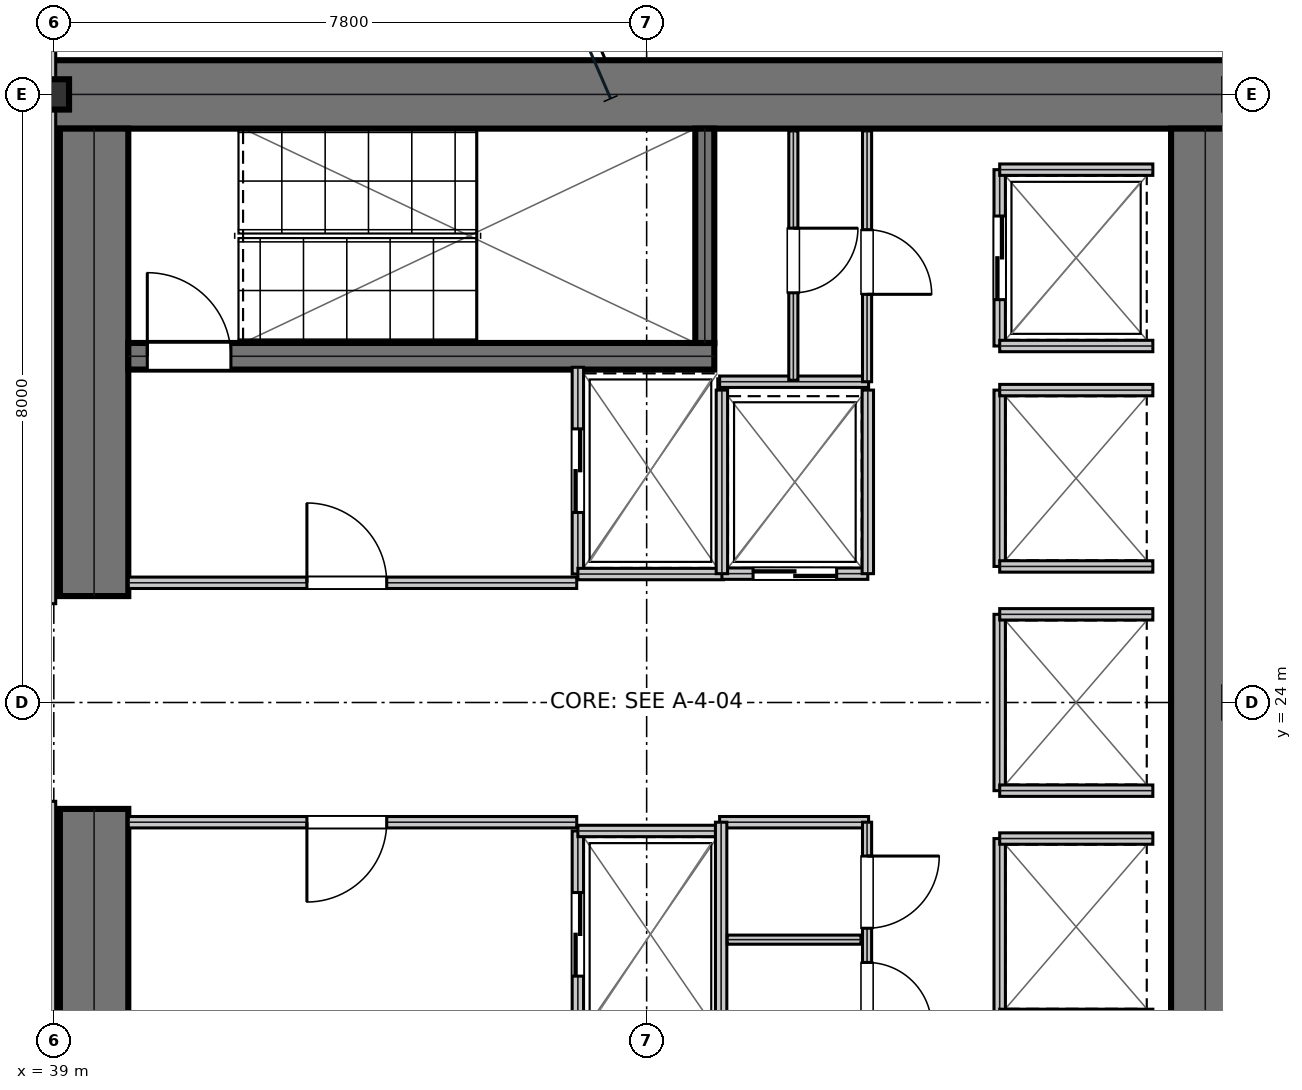
"""IFC4 building model, lengths in metres.
Left out: names, types, materials, properties, quantities, classifications, styles, units other than length and angle.
Written with IfcOpenShell. Run it as: python <this file> out.ifc"""

import sys

from ifc_helpers import new_model, si_unit, direction, frame, frame_2d, origin, origin_2d, place, context, subcontext, project, spatial, rectangle, i_section, extrude, element, fill, save


model = new_model("IFC4")
c1 = context("Model", 3, precision=1e-05, world=origin(), true_north=direction((0.0, 1.0)))
c2 = subcontext(c1, "Body", "Model", "MODEL_VIEW")
j1 = project(units=[si_unit("LENGTHUNIT", "METRE"), si_unit("PLANEANGLEUNIT", "RADIAN")], contexts=[c1])
p1 = place(None, origin())
s1 = spatial("IfcSite", under=j1, at=p1, CompositionType="ELEMENT")
p2 = place(p1, origin())
s2 = spatial("IfcBuilding", under=s1, at=p2, CompositionType="ELEMENT")
p3 = place(p2, frame((0.0, 0.0, 90.45)))
s3 = spatial("IfcBuildingStorey", under=s2, at=p3, CompositionType="ELEMENT", Elevation=90.45)
p4 = place(p3, frame((38.8, 32.0, 0.0), z_axis=(0.0, 0.0, 1.0), x_axis=(1.0, 0.0, 0.0)))
e1 = element("IfcWall", 1, at=p4, inside=s3, PredefinedType="SHEAR", context=c2, shape_type="SweptSolid", body=[
    extrude(rectangle(XDim=16.0, YDim=0.9, at=frame_2d((8.0, 0.0))), origin(), (0.0, 0.0, 1.0), 3.81),
])
for number, where, z_axis, x_axis in (
    (2, (39.53, 16.45, 0.0), (0.0, 0.0, 1.0), (0.0, 1.0, 0.0)),
    (3, (39.53, 25.4, 0.0), (0.0, 0.0, 1.0), (0.0, 1.0, 0.0)),
):
    element("IfcWall", number, at=place(p3, frame(where, z_axis=z_axis, x_axis=x_axis)), inside=s3, PredefinedType="SHEAR", context=c2, shape_type="SweptSolid", body=[
        extrude(rectangle(XDim=6.15, YDim=0.9, at=frame_2d((3.075, 0.0))), origin(), (0.0, 0.0, 1.0), 3.81),
    ])
p5 = place(p3, frame((54.15, 16.45, 0.0), z_axis=(0.0, 0.0, 1.0), x_axis=(0.0, 1.0, 0.0)))
e4 = element("IfcWall", 4, at=p5, inside=s3, PredefinedType="SHEAR", context=c2, shape_type="SweptSolid", body=[
    extrude(rectangle(XDim=15.1, YDim=0.9, at=frame_2d((7.55, 0.0))), origin(), (0.0, 0.0, 1.0), 3.81),
])
p6 = place(p3, frame((39.98, 28.555, 0.0), z_axis=(0.0, 0.0, 1.0), x_axis=(1.0, 0.0, 0.0)))
e5 = element("IfcWall", 5, at=p6, inside=s3, PredefinedType="SHEAR", context=c2, shape_type="SweptSolid", body=[
    extrude(rectangle(XDim=7.71, YDim=0.35, at=frame_2d((3.855, 0.0))), origin(), (0.0, 0.0, 1.0), 3.81),
])
p7 = place(p6, frame((0.25, 0.0, 0.0)))
e6 = element("IfcOpeningElement", 6, at=p7, cuts=e5, PredefinedType="OPENING", context=c2, shape_type="SweptSolid", body=[
    extrude(rectangle(XDim=1.1, YDim=2.15, at=frame_2d((0.55, 1.075))), frame((0.0, 0.185, 0.0), z_axis=(0.0, -1.0, 0.0), x_axis=(1.0, 0.0, 0.0)), (0.0, 0.0, 1.0), 0.37),
])
p8 = place(p3, frame((47.565, 28.73, 0.0), z_axis=(0.0, 0.0, 1.0), x_axis=(0.0, 1.0, 0.0)))
e7 = element("IfcWall", 7, at=p8, inside=s3, PredefinedType="SHEAR", context=c2, shape_type="SweptSolid", body=[
    extrude(rectangle(XDim=2.82, YDim=0.25, at=frame_2d((1.41, 0.0))), origin(), (0.0, 0.0, 1.0), 3.81),
])
p9 = place(p3, frame((39.0, 32.0, 0.0), z_axis=(0.0, 0.0, 1.0), x_axis=(1.0, 0.0, 0.0)))
e8 = element("IfcColumn", 8, at=p9, inside=s3, PredefinedType="COLUMN", context=c2, shape_type="SweptSolid", body=[
    extrude(i_section(OverallWidth=0.401, OverallDepth=0.399, WebThickness=0.025, FlangeThickness=0.04, at=origin_2d()), origin(), (0.0, 0.0, 1.0), 4.044),
])
p10 = place(p3, frame((39.98, 25.575, 0.0), z_axis=(0.0, 0.0, 1.0), x_axis=(1.0, 0.0, 0.0)))
e9 = element("IfcWall", 9, at=p10, inside=s3, PredefinedType="PARTITIONING", context=c2, shape_type="SweptSolid", body=[
    extrude(rectangle(XDim=5.9, YDim=0.15, at=frame_2d((2.95, 0.0))), origin(), (0.0, 0.0, 1.0), 3.81),
])
p11 = place(p10, frame((2.35, 0.0, 0.0)))
e10 = element("IfcOpeningElement", 10, at=p11, cuts=e9, PredefinedType="OPENING", context=c2, shape_type="SweptSolid", body=[
    extrude(rectangle(XDim=1.05, YDim=2.15, at=frame_2d((0.525, 1.075))), frame((0.0, 0.085, 0.0), z_axis=(0.0, -1.0, 0.0), x_axis=(1.0, 0.0, 0.0)), (0.0, 0.0, 1.0), 0.17),
])
p12 = place(p3, frame((39.98, 22.425, 0.0), z_axis=(0.0, 0.0, 1.0), x_axis=(1.0, 0.0, 0.0)))
e11 = element("IfcWall", 11, at=p12, inside=s3, PredefinedType="PARTITIONING", context=c2, shape_type="SweptSolid", body=[
    extrude(rectangle(XDim=5.9, YDim=0.15, at=frame_2d((2.95, 0.0))), origin(), (0.0, 0.0, 1.0), 3.81),
])
p13 = place(p12, frame((2.35, 0.0, 0.0)))
e12 = element("IfcOpeningElement", 12, at=p13, cuts=e11, PredefinedType="OPENING", context=c2, shape_type="SweptSolid", body=[
    extrude(rectangle(XDim=1.05, YDim=2.15, at=frame_2d((0.525, 1.075))), frame((0.0, 0.085, 0.0), z_axis=(0.0, -1.0, 0.0), x_axis=(1.0, 0.0, 0.0)), (0.0, 0.0, 1.0), 0.17),
])
p14 = place(p3, frame((45.895, 25.69, 0.0), z_axis=(0.0, 0.0, 1.0), x_axis=(0.0, 1.0, 0.0)))
e13 = element("IfcWall", 13, at=p14, inside=s3, PredefinedType="PARTITIONING", context=c2, shape_type="SweptSolid", body=[
    extrude(rectangle(XDim=2.72, YDim=0.15, at=frame_2d((1.36, 0.0))), origin(), (0.0, 0.0, 1.0), 3.81),
])
p15 = place(p14, frame((0.81, 0.0, 0.0)))
e14 = element("IfcOpeningElement", 14, at=p15, cuts=e13, PredefinedType="OPENING", context=c2, shape_type="SweptSolid", body=[
    extrude(rectangle(XDim=1.1, YDim=2.15, at=frame_2d((0.55, 1.075))), frame((0.0, 0.085, 0.0), z_axis=(0.0, -1.0, 0.0), x_axis=(1.0, 0.0, 0.0)), (0.0, 0.0, 1.0), 0.17),
])
p16 = place(p3, frame((45.895, 25.69, 0.0), z_axis=(0.0, 0.0, 1.0), x_axis=(1.0, 0.0, 0.0)))
e15 = element("IfcWall", 15, at=p16, inside=s3, PredefinedType="PARTITIONING", context=c2, shape_type="SweptSolid", body=[
    extrude(rectangle(XDim=1.915, YDim=0.15, at=frame_2d((0.958, 0.0))), origin(), (0.0, 0.0, 1.0), 3.81),
])
p17 = place(p3, frame((45.895, 19.59, 0.0), z_axis=(0.0, 0.0, 1.0), x_axis=(0.0, 1.0, 0.0)))
e16 = element("IfcWall", 16, at=p17, inside=s3, PredefinedType="PARTITIONING", context=c2, shape_type="SweptSolid", body=[
    extrude(rectangle(XDim=2.72, YDim=0.15, at=frame_2d((1.36, 0.0))), origin(), (0.0, 0.0, 1.0), 3.81),
])
p18 = place(p17, frame((0.81, 0.0, 0.0)))
e17 = element("IfcOpeningElement", 17, at=p18, cuts=e16, PredefinedType="OPENING", context=c2, shape_type="SweptSolid", body=[
    extrude(rectangle(XDim=1.1, YDim=2.15, at=frame_2d((0.55, 1.075))), frame((0.0, 0.085, 0.0), z_axis=(0.0, -1.0, 0.0), x_axis=(1.0, 0.0, 0.0)), (0.0, 0.0, 1.0), 0.17),
])
p19 = place(p3, frame((45.895, 22.31, 0.0), z_axis=(0.0, 0.0, 1.0), x_axis=(1.0, 0.0, 0.0)))
e18 = element("IfcWall", 18, at=p19, inside=s3, PredefinedType="PARTITIONING", context=c2, shape_type="SweptSolid", body=[
    extrude(rectangle(XDim=1.915, YDim=0.15, at=frame_2d((0.958, 0.0))), origin(), (0.0, 0.0, 1.0), 3.81),
])
p20 = place(p3, frame((47.79, 25.695, 0.0), z_axis=(0.0, 0.0, 1.0), x_axis=(1.0, 0.0, 0.0)))
e19 = element("IfcWall", 19, at=p20, inside=s3, PredefinedType="PARTITIONING", context=c2, shape_type="SweptSolid", body=[
    extrude(rectangle(XDim=1.92, YDim=0.15, at=frame_2d((0.96, 0.0))), origin(), (0.0, 0.0, 1.0), 3.81),
])
p21 = place(p20, frame((0.41, 0.0, 0.0)))
e20 = element("IfcOpeningElement", 20, at=p21, cuts=e19, PredefinedType="OPENING", context=c2, shape_type="SweptSolid", body=[
    extrude(rectangle(XDim=1.1, YDim=2.15, at=frame_2d((0.55, 1.075))), frame((0.0, 0.085, 0.0), z_axis=(0.0, -1.0, 0.0), x_axis=(1.0, 0.0, 0.0)), (0.0, 0.0, 1.0), 0.17),
])
for number, where, z_axis, x_axis in (
    (21, (47.79, 25.695, 0.0), (0.0, 0.0, 1.0), (0.0, 1.0, 0.0)),
    (22, (49.71, 25.695, 0.0), (0.0, 0.0, 1.0), (0.0, 1.0, 0.0)),
):
    element("IfcWall", number, at=place(p3, frame(where, z_axis=z_axis, x_axis=x_axis)), inside=s3, PredefinedType="PARTITIONING", context=c2, shape_type="SweptSolid", body=[
        extrude(rectangle(XDim=2.415, YDim=0.15, at=frame_2d((1.208, 0.0))), origin(), (0.0, 0.0, 1.0), 3.81),
    ])
p22 = place(p3, frame((51.445, 28.69, 0.0), z_axis=(0.0, 0.0, 1.0), x_axis=(0.0, 1.0, 0.0)))
e23 = element("IfcWall", 23, at=p22, inside=s3, PredefinedType="PARTITIONING", context=c2, shape_type="SweptSolid", body=[
    extrude(rectangle(XDim=2.32, YDim=0.15, at=frame_2d((1.16, 0.0))), origin(), (0.0, 0.0, 1.0), 3.81),
])
p23 = place(p22, frame((0.61, 0.0, 0.0)))
e24 = element("IfcOpeningElement", 24, at=p23, cuts=e23, PredefinedType="OPENING", context=c2, shape_type="SweptSolid", body=[
    extrude(rectangle(XDim=1.1, YDim=2.15, at=frame_2d((0.55, 1.075))), frame((0.0, 0.085, 0.0), z_axis=(0.0, -1.0, 0.0), x_axis=(1.0, 0.0, 0.0)), (0.0, 0.0, 1.0), 0.17),
])
for number, where, z_axis, x_axis in (
    (25, (51.445, 28.69, 0.0), (0.0, 0.0, 1.0), (1.0, 0.0, 0.0)),
    (26, (51.445, 31.01, 0.0), (0.0, 0.0, 1.0), (1.0, 0.0, 0.0)),
):
    element("IfcWall", number, at=place(p3, frame(where, z_axis=z_axis, x_axis=x_axis)), inside=s3, PredefinedType="PARTITIONING", context=c2, shape_type="SweptSolid", body=[
        extrude(rectangle(XDim=2.015, YDim=0.15, at=frame_2d((1.007, 0.0))), origin(), (0.0, 0.0, 1.0), 3.81),
    ])
p24 = place(p3, frame((51.445, 25.79, 0.0), z_axis=(0.0, 0.0, 1.0), x_axis=(0.0, 1.0, 0.0)))
e27 = element("IfcWall", 27, at=p24, inside=s3, PredefinedType="PARTITIONING", context=c2, shape_type="SweptSolid", body=[
    extrude(rectangle(XDim=2.32, YDim=0.15, at=frame_2d((1.16, 0.0))), origin(), (0.0, 0.0, 1.0), 3.81),
])
for number, where, z_axis, x_axis in (
    (28, (51.445, 25.79, 0.0), (0.0, 0.0, 1.0), (1.0, 0.0, 0.0)),
    (29, (51.445, 28.11, 0.0), (0.0, 0.0, 1.0), (1.0, 0.0, 0.0)),
):
    element("IfcWall", number, at=place(p3, frame(where, z_axis=z_axis, x_axis=x_axis)), inside=s3, PredefinedType="PARTITIONING", context=c2, shape_type="SweptSolid", body=[
        extrude(rectangle(XDim=2.015, YDim=0.15, at=frame_2d((1.007, 0.0))), origin(), (0.0, 0.0, 1.0), 3.81),
    ])
p25 = place(p3, frame((51.445, 19.89, 0.0), z_axis=(0.0, 0.0, 1.0), x_axis=(0.0, 1.0, 0.0)))
e30 = element("IfcWall", 30, at=p25, inside=s3, PredefinedType="PARTITIONING", context=c2, shape_type="SweptSolid", body=[
    extrude(rectangle(XDim=2.32, YDim=0.15, at=frame_2d((1.16, 0.0))), origin(), (0.0, 0.0, 1.0), 3.81),
])
for number, where, z_axis, x_axis in (
    (31, (51.445, 19.89, 0.0), (0.0, 0.0, 1.0), (1.0, 0.0, 0.0)),
    (32, (51.445, 22.21, 0.0), (0.0, 0.0, 1.0), (1.0, 0.0, 0.0)),
):
    element("IfcWall", number, at=place(p3, frame(where, z_axis=z_axis, x_axis=x_axis)), inside=s3, PredefinedType="PARTITIONING", context=c2, shape_type="SweptSolid", body=[
        extrude(rectangle(XDim=2.015, YDim=0.15, at=frame_2d((1.007, 0.0))), origin(), (0.0, 0.0, 1.0), 3.81),
    ])
p26 = place(p3, frame((51.445, 22.84, 0.0), z_axis=(0.0, 0.0, 1.0), x_axis=(0.0, 1.0, 0.0)))
e33 = element("IfcWall", 33, at=p26, inside=s3, PredefinedType="PARTITIONING", context=c2, shape_type="SweptSolid", body=[
    extrude(rectangle(XDim=2.32, YDim=0.15, at=frame_2d((1.16, 0.0))), origin(), (0.0, 0.0, 1.0), 3.81),
])
for number, where, z_axis, x_axis in (
    (34, (51.445, 22.84, 0.0), (0.0, 0.0, 1.0), (1.0, 0.0, 0.0)),
    (35, (51.445, 25.16, 0.0), (0.0, 0.0, 1.0), (1.0, 0.0, 0.0)),
):
    element("IfcWall", number, at=place(p3, frame(where, z_axis=z_axis, x_axis=x_axis)), inside=s3, PredefinedType="PARTITIONING", context=c2, shape_type="SweptSolid", body=[
        extrude(rectangle(XDim=2.015, YDim=0.15, at=frame_2d((1.007, 0.0))), origin(), (0.0, 0.0, 1.0), 3.81),
    ])
p27 = place(p3, frame((47.76, 22.425, 0.0), z_axis=(0.0, 0.0, 1.0), x_axis=(1.0, 0.0, 0.0)))
e36 = element("IfcWall", 36, at=p27, inside=s3, PredefinedType="PARTITIONING", context=c2, shape_type="SweptSolid", body=[
    extrude(rectangle(XDim=1.96, YDim=0.15, at=frame_2d((0.98, 0.0))), origin(), (0.0, 0.0, 1.0), 3.81),
])
p28 = place(p3, frame((47.78, 16.45, 0.0), z_axis=(0.0, 0.0, 1.0), x_axis=(0.0, 1.0, 0.0)))
e37 = element("IfcWall", 37, at=p28, inside=s3, PredefinedType="PARTITIONING", context=c2, shape_type="SweptSolid", body=[
    extrude(rectangle(XDim=5.975, YDim=0.15, at=frame_2d((2.988, 0.0))), origin(), (0.0, 0.0, 1.0), 3.81),
])
p29 = place(p3, frame((47.86, 20.88, 0.0), z_axis=(0.0, 0.0, 1.0), x_axis=(1.0, 0.0, 0.0)))
e38 = element("IfcWall", 38, at=p29, inside=s3, PredefinedType="PARTITIONING", context=c2, shape_type="SweptSolid", body=[
    extrude(rectangle(XDim=1.76, YDim=0.12, at=frame_2d((0.88, 0.0))), origin(), (0.0, 0.0, 1.0), 3.81),
])
p30 = place(p3, frame((49.7, 16.48, 0.0), z_axis=(0.0, 0.0, 1.0), x_axis=(0.0, 1.0, 0.0)))
e39 = element("IfcWall", 39, at=p30, inside=s3, PredefinedType="PARTITIONING", context=c2, shape_type="SweptSolid", body=[
    extrude(rectangle(XDim=5.945, YDim=0.12, at=frame_2d((2.973, 0.0))), origin(), (0.0, 0.0, 1.0), 3.81),
])
p31 = place(p30, frame((1.6, 0.0, 0.0)))
e40 = element("IfcOpeningElement", 40, at=p31, cuts=e39, PredefinedType="OPENING", context=c2, shape_type="SweptSolid", body=[
    extrude(rectangle(XDim=0.85, YDim=2.15, at=frame_2d((0.425, 1.075))), frame((0.0, 0.07, 0.0), z_axis=(0.0, -1.0, 0.0), x_axis=(1.0, 0.0, 0.0)), (0.0, 0.0, 1.0), 0.14),
])
p32 = place(p30, frame((3.25, 0.0, 0.0)))
e41 = element("IfcOpeningElement", 41, at=p32, cuts=e39, PredefinedType="OPENING", context=c2, shape_type="SweptSolid", body=[
    extrude(rectangle(XDim=0.85, YDim=2.15, at=frame_2d((0.425, 1.075))), frame((0.0, 0.07, 0.0), z_axis=(0.0, -1.0, 0.0), x_axis=(1.0, 0.0, 0.0)), (0.0, 0.0, 1.0), 0.14),
])
p33 = place(p30, frame((4.55, 0.0, 0.0)))
e42 = element("IfcOpeningElement", 42, at=p33, cuts=e39, PredefinedType="OPENING", context=c2, shape_type="SweptSolid", body=[
    extrude(rectangle(XDim=0.95, YDim=2.15, at=frame_2d((0.475, 1.075))), frame((0.0, 0.07, 0.0), z_axis=(0.0, -1.0, 0.0), x_axis=(1.0, 0.0, 0.0)), (0.0, 0.0, 1.0), 0.14),
])
p34 = place(p3, frame((47.76, 28.22, 0.0), z_axis=(0.0, 0.0, 1.0), x_axis=(1.0, 0.0, 0.0)))
e43 = element("IfcWall", 43, at=p34, inside=s3, PredefinedType="PARTITIONING", context=c2, shape_type="SweptSolid", body=[
    extrude(rectangle(XDim=1.96, YDim=0.15, at=frame_2d((0.98, 0.0))), origin(), (0.0, 0.0, 1.0), 3.81),
])
p35 = place(p3, frame((48.73, 28.24, 0.0), z_axis=(0.0, 0.0, 1.0), x_axis=(0.0, 1.0, 0.0)))
e44 = element("IfcWall", 44, at=p35, inside=s3, PredefinedType="PARTITIONING", context=c2, shape_type="SweptSolid", body=[
    extrude(rectangle(XDim=3.28, YDim=0.12, at=frame_2d((1.64, 0.0))), origin(), (0.0, 0.0, 1.0), 3.81),
])
p36 = place(p35, frame((1.15, 0.0, 0.0)))
e45 = element("IfcOpeningElement", 45, at=p36, cuts=e44, PredefinedType="OPENING", context=c2, shape_type="SweptSolid", body=[
    extrude(rectangle(XDim=0.85, YDim=2.15, at=frame_2d((0.425, 1.075))), frame((0.0, 0.07, 0.0), z_axis=(0.0, -1.0, 0.0), x_axis=(1.0, 0.0, 0.0)), (0.0, 0.0, 1.0), 0.14),
])
p37 = place(p3, frame((49.7, 28.22, 0.0), z_axis=(0.0, 0.0, 1.0), x_axis=(0.0, 1.0, 0.0)))
e46 = element("IfcWall", 46, at=p37, inside=s3, PredefinedType="PARTITIONING", context=c2, shape_type="SweptSolid", body=[
    extrude(rectangle(XDim=3.3, YDim=0.12, at=frame_2d((1.65, 0.0))), origin(), (0.0, 0.0, 1.0), 3.81),
])
p38 = place(p37, frame((1.15, 0.0, 0.0)))
e47 = element("IfcOpeningElement", 47, at=p38, cuts=e46, PredefinedType="OPENING", context=c2, shape_type="SweptSolid", body=[
    extrude(rectangle(XDim=0.85, YDim=2.15, at=frame_2d((0.425, 1.075))), frame((0.0, 0.07, 0.0), z_axis=(0.0, -1.0, 0.0), x_axis=(1.0, 0.0, 0.0)), (0.0, 0.0, 1.0), 0.14),
])
for number, where, z_axis, x_axis in (
    (48, (38.95, 14.5, 0.0), (0.0, 0.0, 1.0), (0.0, 1.0, 0.0)),
    (49, (38.95, 25.3, 0.0), (0.0, 0.0, 1.0), (0.0, 1.0, 0.0)),
):
    element("IfcWall", number, at=place(p3, frame(where, z_axis=z_axis, x_axis=x_axis)), inside=s3, PredefinedType="PARTITIONING", context=c2, shape_type="SweptSolid", body=[
        extrude(rectangle(XDim=8.2, YDim=0.15, at=frame_2d((4.1, 0.0))), origin(), (0.0, 0.0, 1.0), 3.181),
    ])
p39 = place(p11, origin())
e50 = element("IfcDoor", 50, at=p39, inside=s3, OperationType="SINGLE_SWING_LEFT", PredefinedType="DOOR", context=c2, shape_type="SweptSolid", body=[
    extrude(rectangle(XDim=1.05, YDim=2.15, at=frame_2d((0.525, 1.075))), frame((0.0, 0.025, 0.0), z_axis=(0.0, -1.0, 0.0), x_axis=(1.0, 0.0, 0.0)), (0.0, 0.0, 1.0), 0.05),
])
fill(e10, e50)
p40 = place(p13, frame((1.05, 0.0, 0.0), z_axis=(0.0, 0.0, 1.0), x_axis=(-1.0, 0.0, 0.0)))
e51 = element("IfcDoor", 51, at=p40, inside=s3, OperationType="SINGLE_SWING_RIGHT", PredefinedType="DOOR", context=c2, shape_type="SweptSolid", body=[
    extrude(rectangle(XDim=1.05, YDim=2.15, at=frame_2d((0.525, 1.075))), frame((0.0, 0.025, 0.0), z_axis=(0.0, -1.0, 0.0), x_axis=(1.0, 0.0, 0.0)), (0.0, 0.0, 1.0), 0.05),
])
fill(e12, e51)
p41 = place(p15, frame((1.1, 0.0, 0.0), z_axis=(0.0, 0.0, 1.0), x_axis=(-1.0, 0.0, 0.0)))
e52 = element("IfcDoor", 52, at=p41, inside=s3, OperationType="DOUBLE_DOOR_SLIDING", PredefinedType="DOOR", context=c2, shape_type="SweptSolid", body=[
    extrude(rectangle(XDim=1.1, YDim=2.15, at=frame_2d((0.55, 1.075))), frame((0.0, 0.025, 0.0), z_axis=(0.0, -1.0, 0.0), x_axis=(1.0, 0.0, 0.0)), (0.0, 0.0, 1.0), 0.05),
])
fill(e14, e52)
p42 = place(p18, frame((1.1, 0.0, 0.0), z_axis=(0.0, 0.0, 1.0), x_axis=(-1.0, 0.0, 0.0)))
e53 = element("IfcDoor", 53, at=p42, inside=s3, OperationType="DOUBLE_DOOR_SLIDING", PredefinedType="DOOR", context=c2, shape_type="SweptSolid", body=[
    extrude(rectangle(XDim=1.1, YDim=2.15, at=frame_2d((0.55, 1.075))), frame((0.0, 0.025, 0.0), z_axis=(0.0, -1.0, 0.0), x_axis=(1.0, 0.0, 0.0)), (0.0, 0.0, 1.0), 0.05),
])
fill(e17, e53)
p43 = place(p21, frame((1.1, 0.0, 0.0), z_axis=(0.0, 0.0, 1.0), x_axis=(-1.0, 0.0, 0.0)))
e54 = element("IfcDoor", 54, at=p43, inside=s3, OperationType="DOUBLE_DOOR_SLIDING", PredefinedType="DOOR", context=c2, shape_type="SweptSolid", body=[
    extrude(rectangle(XDim=1.1, YDim=2.15, at=frame_2d((0.55, 1.075))), frame((0.0, 0.025, 0.0), z_axis=(0.0, -1.0, 0.0), x_axis=(1.0, 0.0, 0.0)), (0.0, 0.0, 1.0), 0.05),
])
fill(e20, e54)
p44 = place(p23, frame((1.1, 0.0, 0.0), z_axis=(0.0, 0.0, 1.0), x_axis=(-1.0, 0.0, 0.0)))
e55 = element("IfcDoor", 55, at=p44, inside=s3, OperationType="DOUBLE_DOOR_SLIDING", PredefinedType="DOOR", context=c2, shape_type="SweptSolid", body=[
    extrude(rectangle(XDim=1.1, YDim=2.15, at=frame_2d((0.55, 1.075))), frame((0.0, 0.025, 0.0), z_axis=(0.0, -1.0, 0.0), x_axis=(1.0, 0.0, 0.0)), (0.0, 0.0, 1.0), 0.05),
])
fill(e24, e55)
p45 = place(p32, frame((0.85, 0.0, 0.0), z_axis=(0.0, 0.0, 1.0), x_axis=(-1.0, 0.0, 0.0)))
e56 = element("IfcDoor", 56, at=p45, inside=s3, OperationType="SINGLE_SWING_RIGHT", PredefinedType="DOOR", context=c2, shape_type="SweptSolid", body=[
    extrude(rectangle(XDim=0.85, YDim=2.15, at=frame_2d((0.425, 1.075))), frame((0.0, 0.025, 0.0), z_axis=(0.0, -1.0, 0.0), x_axis=(1.0, 0.0, 0.0)), (0.0, 0.0, 1.0), 0.05),
])
fill(e41, e56)
p46 = place(p33, frame((0.95, 0.0, 0.0), z_axis=(0.0, 0.0, 1.0), x_axis=(-1.0, 0.0, 0.0)))
e57 = element("IfcDoor", 57, at=p46, inside=s3, OperationType="SINGLE_SWING_LEFT", PredefinedType="DOOR", context=c2, shape_type="SweptSolid", body=[
    extrude(rectangle(XDim=0.95, YDim=2.15, at=frame_2d((0.475, 1.075))), frame((0.0, 0.025, 0.0), z_axis=(0.0, -1.0, 0.0), x_axis=(1.0, 0.0, 0.0)), (0.0, 0.0, 1.0), 0.05),
])
fill(e42, e57)
p47 = place(p36, frame((0.85, 0.0, 0.0), z_axis=(0.0, 0.0, 1.0), x_axis=(-1.0, 0.0, 0.0)))
e58 = element("IfcDoor", 58, at=p47, inside=s3, OperationType="SINGLE_SWING_LEFT", PredefinedType="DOOR", context=c2, shape_type="SweptSolid", body=[
    extrude(rectangle(XDim=0.85, YDim=2.15, at=frame_2d((0.425, 1.075))), frame((0.0, 0.025, 0.0), z_axis=(0.0, -1.0, 0.0), x_axis=(1.0, 0.0, 0.0)), (0.0, 0.0, 1.0), 0.05),
])
fill(e45, e58)
p48 = place(p38, frame((0.85, 0.0, 0.0), z_axis=(0.0, 0.0, 1.0), x_axis=(-1.0, 0.0, 0.0)))
e59 = element("IfcDoor", 59, at=p48, inside=s3, OperationType="SINGLE_SWING_RIGHT", PredefinedType="DOOR", context=c2, shape_type="SweptSolid", body=[
    extrude(rectangle(XDim=0.85, YDim=2.15, at=frame_2d((0.425, 1.075))), frame((0.0, 0.025, 0.0), z_axis=(0.0, -1.0, 0.0), x_axis=(1.0, 0.0, 0.0)), (0.0, 0.0, 1.0), 0.05),
])
fill(e47, e59)
p49 = place(p7, origin())
e60 = element("IfcDoor", 60, at=p49, inside=s3, OperationType="SINGLE_SWING_LEFT", PredefinedType="DOOR", context=c2, shape_type="SweptSolid", body=[
    extrude(rectangle(XDim=1.1, YDim=2.15, at=frame_2d((0.55, 1.075))), frame((0.0, 0.025, 0.0), z_axis=(0.0, -1.0, 0.0), x_axis=(1.0, 0.0, 0.0)), (0.0, 0.0, 1.0), 0.05),
])
fill(e6, e60)
save(model, sys.argv[1])
